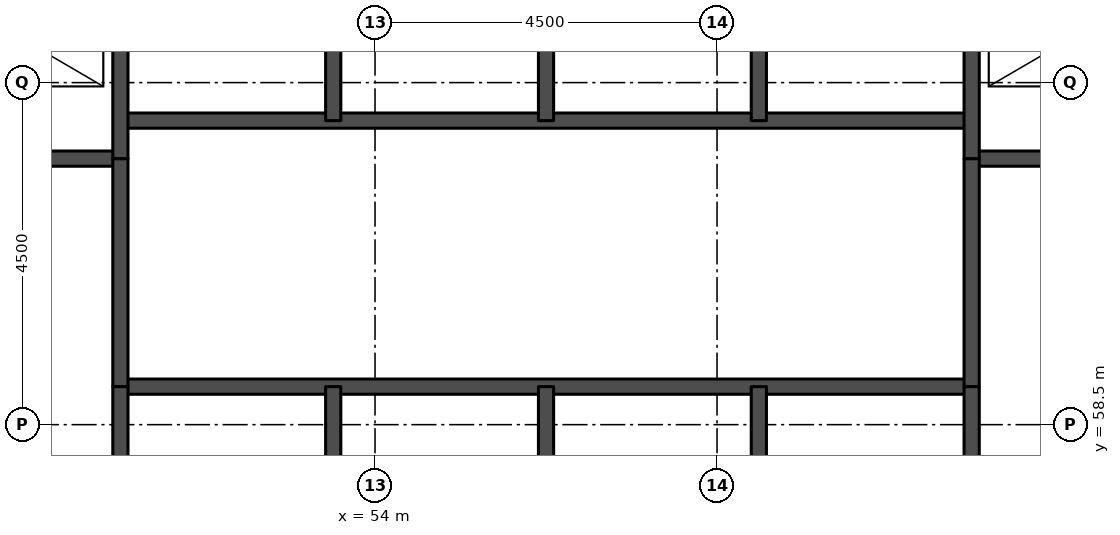
"""IFC4 building model, lengths in metres.
Left out: names, types, materials, properties, quantities, classifications, styles, units other than length and angle.
Written with IfcOpenShell. Run it as: python <this file> out.ifc"""

import sys

from ifc_helpers import new_model, si_unit, direction, frame, frame_2d, origin, place, context, subcontext, project, spatial, rectangle, extrude, element, save


model = new_model("IFC4")
c1 = context("Model", 3, precision=1e-05, world=origin(), true_north=direction((0.0, 1.0)))
c2 = subcontext(c1, "Body", "Model", "MODEL_VIEW")
j1 = project(units=[si_unit("LENGTHUNIT", "METRE"), si_unit("PLANEANGLEUNIT", "RADIAN")], contexts=[c1])
p1 = place(None, origin())
s1 = spatial("IfcSite", under=j1, at=p1, CompositionType="ELEMENT")
p2 = place(p1, origin())
s2 = spatial("IfcBuilding", under=s1, at=p2, CompositionType="ELEMENT")
p3 = place(p2, frame((0.0, 0.0, 29.7)))
s3 = spatial("IfcBuildingStorey", under=s2, at=p3, CompositionType="ELEMENT", Elevation=29.7)
p4 = place(p3, frame((50.65, 59.0, 0.0), z_axis=(0.0, 0.0, 1.0), x_axis=(1.0, 0.0, 0.0)))
e1 = element("IfcWall", 1, at=p4, inside=s3, PredefinedType="SOLIDWALL", context=c2, shape_type="SweptSolid", body=[
    extrude(rectangle(XDim=11.2, YDim=0.2, at=frame_2d((5.6, 0.0))), origin(), (0.0, 0.0, 1.0), 3.3),
])
for number, where, z_axis, x_axis in (
    (2, (45.5, 62.0, 0.0), (0.0, 0.0, 1.0), (1.0, 0.0, 0.0)),
    (3, (61.85, 62.0, 0.0), (0.0, 0.0, 1.0), (1.0, 0.0, 0.0)),
):
    element("IfcWall", number, at=place(p3, frame(where, z_axis=z_axis, x_axis=x_axis)), inside=s3, PredefinedType="SOLIDWALL", context=c2, shape_type="SweptSolid", body=[
        extrude(rectangle(XDim=5.15, YDim=0.2, at=frame_2d((2.575, 0.0))), origin(), (0.0, 0.0, 1.0), 3.08),
    ])
p5 = place(p3, frame((50.65, 62.5, 0.0), z_axis=(0.0, 0.0, 1.0), x_axis=(1.0, 0.0, 0.0)))
e4 = element("IfcWall", 4, at=p5, inside=s3, PredefinedType="SOLIDWALL", context=c2, shape_type="SweptSolid", body=[
    extrude(rectangle(XDim=11.2, YDim=0.2, at=frame_2d((5.6, 0.0))), origin(), (0.0, 0.0, 1.0), 3.3),
])
p6 = place(p3, frame((50.65, 59.0, 0.0), z_axis=(0.0, 0.0, 1.0), x_axis=(0.0, 1.0, 0.0)))
e5 = element("IfcWall", 5, at=p6, inside=s3, PredefinedType="SOLIDWALL", context=c2, shape_type="SweptSolid", body=[
    extrude(rectangle(XDim=3.0, YDim=0.2, at=frame_2d((1.5, 0.0))), origin(), (0.0, 0.0, 1.0), 3.3),
])
p7 = place(p3, frame((50.65, 56.2, 0.0), z_axis=(0.0, 0.0, 1.0), x_axis=(0.0, 1.0, 0.0)))
e6 = element("IfcWall", 6, at=p7, inside=s3, PredefinedType="SOLIDWALL", context=c2, shape_type="SweptSolid", body=[
    extrude(rectangle(XDim=2.8, YDim=0.2, at=frame_2d((1.4, 0.0))), origin(), (0.0, 0.0, 1.0), 3.08),
])
p8 = place(p3, frame((50.65, 62.0, 0.0), z_axis=(0.0, 0.0, 1.0), x_axis=(0.0, 1.0, 0.0)))
e7 = element("IfcWall", 7, at=p8, inside=s3, PredefinedType="SOLIDWALL", context=c2, shape_type="SweptSolid", body=[
    extrude(rectangle(XDim=3.3, YDim=0.2, at=frame_2d((1.65, 0.0))), origin(), (0.0, 0.0, 1.0), 3.08),
])
for number, where, z_axis, x_axis in (
    (8, (53.45, 56.2, 0.0), (0.0, 0.0, 1.0), (0.0, 1.0, 0.0)),
    (9, (53.45, 62.5, 0.0), (0.0, 0.0, 1.0), (0.0, 1.0, 0.0)),
    (10, (56.25, 56.2, 0.0), (0.0, 0.0, 1.0), (0.0, 1.0, 0.0)),
    (11, (56.25, 62.5, 0.0), (0.0, 0.0, 1.0), (0.0, 1.0, 0.0)),
    (12, (59.05, 56.2, 0.0), (0.0, 0.0, 1.0), (0.0, 1.0, 0.0)),
    (13, (59.05, 62.5, 0.0), (0.0, 0.0, 1.0), (0.0, 1.0, 0.0)),
):
    element("IfcWall", number, at=place(p3, frame(where, z_axis=z_axis, x_axis=x_axis)), inside=s3, PredefinedType="SOLIDWALL", context=c2, shape_type="SweptSolid", body=[
        extrude(rectangle(XDim=2.8, YDim=0.2, at=frame_2d((1.4, 0.0))), origin(), (0.0, 0.0, 1.0), 3.08),
    ])
p9 = place(p3, frame((61.85, 59.0, 0.0), z_axis=(0.0, 0.0, 1.0), x_axis=(0.0, 1.0, 0.0)))
e14 = element("IfcWall", 14, at=p9, inside=s3, PredefinedType="SOLIDWALL", context=c2, shape_type="SweptSolid", body=[
    extrude(rectangle(XDim=3.0, YDim=0.2, at=frame_2d((1.5, 0.0))), origin(), (0.0, 0.0, 1.0), 3.3),
])
p10 = place(p3, frame((61.85, 56.2, 0.0), z_axis=(0.0, 0.0, 1.0), x_axis=(0.0, 1.0, 0.0)))
e15 = element("IfcWall", 15, at=p10, inside=s3, PredefinedType="SOLIDWALL", context=c2, shape_type="SweptSolid", body=[
    extrude(rectangle(XDim=2.8, YDim=0.2, at=frame_2d((1.4, 0.0))), origin(), (0.0, 0.0, 1.0), 3.08),
])
p11 = place(p3, frame((61.85, 62.0, 0.0), z_axis=(0.0, 0.0, 1.0), x_axis=(0.0, 1.0, 0.0)))
e16 = element("IfcWall", 16, at=p11, inside=s3, PredefinedType="SOLIDWALL", context=c2, shape_type="SweptSolid", body=[
    extrude(rectangle(XDim=3.3, YDim=0.2, at=frame_2d((1.65, 0.0))), origin(), (0.0, 0.0, 1.0), 3.08),
])
save(model, sys.argv[1])
